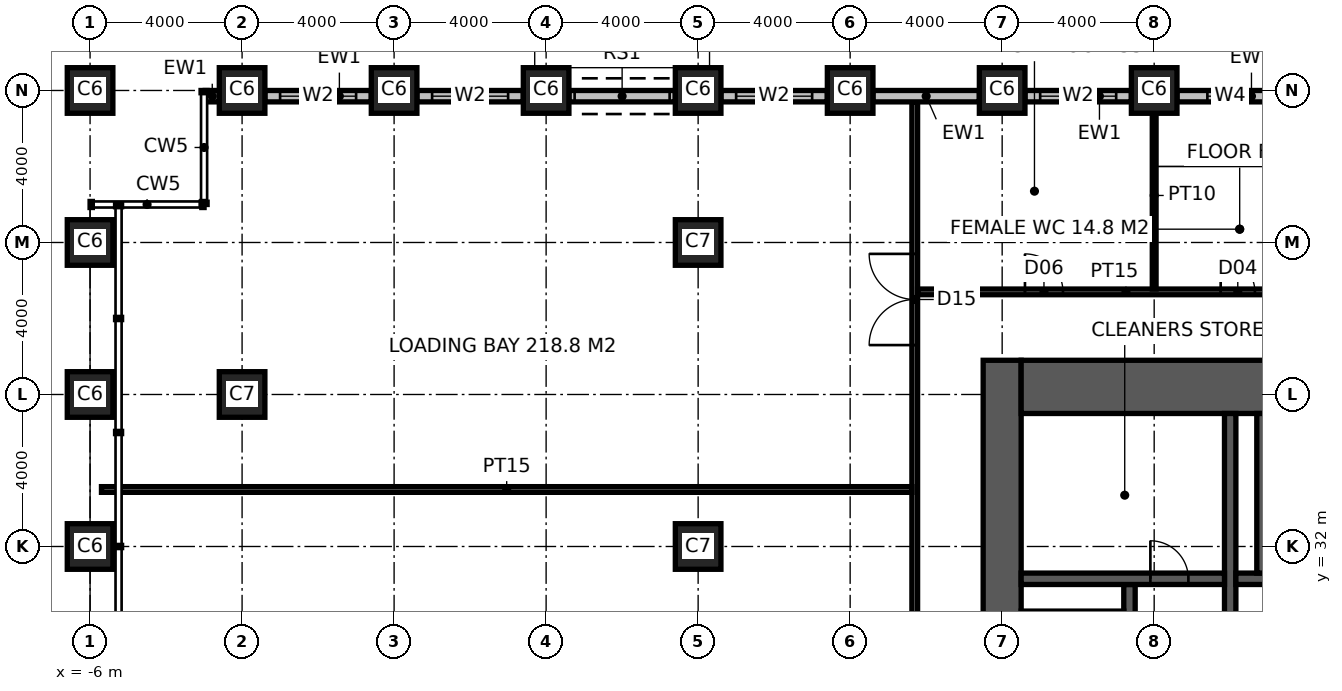
"""IFC4 building model, lengths in metres.
Left out: names, types, materials, properties, quantities, classifications, styles, units other than length and angle.
Written with IfcOpenShell. Run it as: python <this file> out.ifc"""

import sys

from ifc_helpers import new_model, si_unit, direction, frame, frame_2d, origin, origin_2d, place, context, subcontext, project, spatial, rectangle, hollow_rectangle, extrude, element, fill, save


model = new_model("IFC4")
c1 = context("Model", 3, precision=1e-05, world=origin(), true_north=direction((0.0, 1.0)))
c2 = subcontext(c1, "Body", "Model", "MODEL_VIEW")
j1 = project(units=[si_unit("LENGTHUNIT", "METRE"), si_unit("PLANEANGLEUNIT", "RADIAN")], contexts=[c1])
p1 = place(None, origin())
s1 = spatial("IfcSite", under=j1, at=p1, CompositionType="ELEMENT")
p2 = place(p1, origin())
s2 = spatial("IfcBuilding", under=s1, at=p2, CompositionType="ELEMENT")
p3 = place(p2, origin())
s3 = spatial("IfcBuildingStorey", under=s2, at=p3, CompositionType="ELEMENT", Elevation=0.0)
for number, where, z_axis, x_axis in (
    (1, (-6.0, 32.0, -0.3), (0.0, 0.0, 1.0), (1.0, 0.0, 0.0)),
    (2, (-6.0, 36.0, -0.3), (0.0, 0.0, 1.0), (1.0, 0.0, 0.0)),
    (3, (-6.0, 40.0, -0.3), (0.0, 0.0, 1.0), (1.0, 0.0, 0.0)),
    (4, (-6.0, 44.0, -0.3), (0.0, 0.0, 1.0), (1.0, 0.0, 0.0)),
    (5, (-2.0, 44.0, -0.3), (0.0, 0.0, 1.0), (1.0, 0.0, 0.0)),
    (6, (2.0, 44.0, -0.3), (0.0, 0.0, 1.0), (1.0, 0.0, 0.0)),
    (7, (6.0, 44.0, -0.3), (0.0, 0.0, 1.0), (1.0, 0.0, 0.0)),
    (8, (10.0, 44.0, -0.3), (0.0, 0.0, 1.0), (1.0, 0.0, 0.0)),
    (9, (14.0, 44.0, -0.3), (0.0, 0.0, 1.0), (1.0, 0.0, 0.0)),
    (10, (18.0, 44.0, -0.3), (0.0, 0.0, 1.0), (1.0, 0.0, 0.0)),
    (11, (22.0, 44.0, -0.3), (0.0, 0.0, 1.0), (1.0, 0.0, 0.0)),
):
    element("IfcColumn", number, at=place(p3, frame(where, z_axis=z_axis, x_axis=x_axis)), inside=s3, PredefinedType="COLUMN", context=c2, shape_type="SweptSolid", body=[
        extrude(hollow_rectangle(XDim=1.2, YDim=1.2, WallThickness=0.125, at=origin_2d()), origin(), (0.0, 0.0, 1.0), 6.3),
    ])
for number, where, z_axis, x_axis in (
    (12, (-2.0, 36.0, -0.3), (0.0, 0.0, 1.0), (1.0, 0.0, 0.0)),
    (13, (10.0, 32.0, -0.3), (0.0, 0.0, 1.0), (1.0, 0.0, 0.0)),
    (14, (10.0, 40.0, -0.3), (0.0, 0.0, 1.0), (1.0, 0.0, 0.0)),
):
    element("IfcColumn", number, at=place(p3, frame(where, z_axis=z_axis, x_axis=x_axis)), inside=s3, PredefinedType="COLUMN", context=c2, shape_type="SweptSolid", body=[
        extrude(hollow_rectangle(XDim=1.2, YDim=1.2, WallThickness=0.1, at=origin_2d()), origin(), (0.0, 0.0, 1.0), 6.3),
    ])
p4 = place(p3, frame((18.0, 17.1, -0.3), z_axis=(0.0, 0.0, 1.0), x_axis=(0.0, 1.0, 0.0)))
e15 = element("IfcWall", 15, at=p4, inside=s3, PredefinedType="SHEAR", context=c2, shape_type="SweptSolid", body=[
    extrude(rectangle(XDim=19.8, YDim=1.0, at=frame_2d((9.9, 0.0))), origin(), (0.0, 0.0, 1.0), 6.15),
])
p5 = place(p3, frame((18.5, 36.2, -0.3), z_axis=(0.0, 0.0, 1.0), x_axis=(1.0, 0.0, 0.0)))
e16 = element("IfcWall", 16, at=p5, inside=s3, PredefinedType="SHEAR", context=c2, shape_type="SweptSolid", body=[
    extrude(rectangle(XDim=23.0, YDim=1.4, at=frame_2d((11.5, 0.0))), origin(), (0.0, 0.0, 1.0), 6.15),
])
p6 = place(p5, frame((15.8, 0.0, 0.3)))
e17 = element("IfcOpeningElement", 17, at=p6, cuts=e16, PredefinedType="OPENING", context=c2, shape_type="SweptSolid", body=[
    extrude(rectangle(XDim=1.0, YDim=2.2, at=frame_2d((0.5, 1.1))), frame((0.0, 0.71, 0.0), z_axis=(0.0, -1.0, 0.0), x_axis=(1.0, 0.0, 0.0)), (0.0, 0.0, 1.0), 1.42),
])
p7 = place(p3, frame((24.0, 18.5, -0.3), z_axis=(0.0, 0.0, 1.0), x_axis=(0.0, 1.0, 0.0)))
e18 = element("IfcWall", 18, at=p7, inside=s3, PredefinedType="SHEAR", context=c2, shape_type="SweptSolid", body=[
    extrude(rectangle(XDim=17.0, YDim=0.3, at=frame_2d((8.5, 0.0))), origin(), (0.0, 0.0, 1.0), 6.15),
])
p8 = place(p7, frame((9.6, 0.0, 0.3)))
e19 = element("IfcOpeningElement", 19, at=p8, cuts=e18, PredefinedType="OPENING", context=c2, shape_type="SweptSolid", body=[
    extrude(rectangle(XDim=1.5, YDim=2.4, at=frame_2d((0.75, 1.2))), frame((0.0, 0.16, 0.0), z_axis=(0.0, -1.0, 0.0), x_axis=(1.0, 0.0, 0.0)), (0.0, 0.0, 1.0), 0.32),
])
p9 = place(p3, frame((24.15, 31.15, -0.3), z_axis=(0.0, 0.0, 1.0), x_axis=(1.0, 0.0, 0.0)))
e20 = element("IfcWall", 20, at=p9, inside=s3, PredefinedType="SHEAR", context=c2, shape_type="SweptSolid", body=[
    extrude(rectangle(XDim=11.25, YDim=0.3, at=frame_2d((5.625, 0.0))), origin(), (0.0, 0.0, 1.0), 6.15),
])
p10 = place(p9, frame((10.15, 0.0, 0.3)))
e21 = element("IfcOpeningElement", 21, at=p10, cuts=e20, PredefinedType="OPENING", context=c2, shape_type="SweptSolid", body=[
    extrude(rectangle(XDim=1.0, YDim=2.2, at=frame_2d((0.5, 1.1))), frame((0.0, 0.16, 0.0), z_axis=(0.0, -1.0, 0.0), x_axis=(1.0, 0.0, 0.0)), (0.0, 0.0, 1.0), 0.32),
])
p11 = place(p9, frame((1.6, 0.0, 0.3)))
e22 = element("IfcOpeningElement", 22, at=p11, cuts=e20, PredefinedType="OPENING", context=c2, shape_type="SweptSolid", body=[
    extrude(rectangle(XDim=1.3, YDim=2.4, at=frame_2d((0.65, 1.2))), frame((0.0, 0.16, 0.0), z_axis=(0.0, -1.0, 0.0), x_axis=(1.0, 0.0, 0.0)), (0.0, 0.0, 1.0), 0.32),
])
p12 = place(p9, frame((4.4, 0.0, 0.3)))
e23 = element("IfcOpeningElement", 23, at=p12, cuts=e20, PredefinedType="OPENING", context=c2, shape_type="SweptSolid", body=[
    extrude(rectangle(XDim=1.3, YDim=2.4, at=frame_2d((0.65, 1.2))), frame((0.0, 0.16, 0.0), z_axis=(0.0, -1.0, 0.0), x_axis=(1.0, 0.0, 0.0)), (0.0, 0.0, 1.0), 0.32),
])
p13 = place(p9, frame((7.25, 0.0, 0.3)))
e24 = element("IfcOpeningElement", 24, at=p13, cuts=e20, PredefinedType="OPENING", context=c2, shape_type="SweptSolid", body=[
    extrude(rectangle(XDim=1.4, YDim=2.4, at=frame_2d((0.7, 1.2))), frame((0.0, 0.16, 0.0), z_axis=(0.0, -1.0, 0.0), x_axis=(1.0, 0.0, 0.0)), (0.0, 0.0, 1.0), 0.32),
])
p14 = place(p3, frame((21.35, 18.5, -0.3), z_axis=(0.0, 0.0, 1.0), x_axis=(0.0, 1.0, 0.0)))
e25 = element("IfcWall", 25, at=p14, inside=s3, PredefinedType="SHEAR", context=c2, shape_type="SweptSolid", body=[
    extrude(rectangle(XDim=12.5, YDim=0.3, at=frame_2d((6.25, 0.0))), origin(), (0.0, 0.0, 1.0), 6.15),
])
p15 = place(p14, frame((8.15, 0.0, 0.3)))
e26 = element("IfcOpeningElement", 26, at=p15, cuts=e25, PredefinedType="OPENING", context=c2, shape_type="SweptSolid", body=[
    extrude(rectangle(XDim=1.0, YDim=2.2, at=frame_2d((0.5, 1.1))), frame((0.0, 0.16, 0.0), z_axis=(0.0, -1.0, 0.0), x_axis=(1.0, 0.0, 0.0)), (0.0, 0.0, 1.0), 0.32),
])
p16 = place(p3, frame((18.5, 31.15, -0.3), z_axis=(0.0, 0.0, 1.0), x_axis=(1.0, 0.0, 0.0)))
e27 = element("IfcWall", 27, at=p16, inside=s3, PredefinedType="SHEAR", context=c2, shape_type="SweptSolid", body=[
    extrude(rectangle(XDim=5.35, YDim=0.3, at=frame_2d((2.675, 0.0))), origin(), (0.0, 0.0, 1.0), 6.15),
])
p17 = place(p16, frame((3.4, 0.0, 0.3)))
e28 = element("IfcOpeningElement", 28, at=p17, cuts=e27, PredefinedType="OPENING", context=c2, shape_type="SweptSolid", body=[
    extrude(rectangle(XDim=1.0, YDim=2.2, at=frame_2d((0.5, 1.1))), frame((0.0, 0.16, 0.0), z_axis=(0.0, -1.0, 0.0), x_axis=(1.0, 0.0, 0.0)), (0.0, 0.0, 1.0), 0.32),
])
p18 = place(p3, frame((24.85, 31.3, -0.3), z_axis=(0.0, 0.0, 1.0), x_axis=(0.0, 1.0, 0.0)))
e29 = element("IfcWall", 29, at=p18, inside=s3, PredefinedType="SHEAR", context=c2, shape_type="SweptSolid", body=[
    extrude(rectangle(XDim=4.2, YDim=0.3, at=frame_2d((2.1, 0.0))), origin(), (0.0, 0.0, 1.0), 6.15),
])
p19 = place(p3, frame((15.7, 15.225, 0.0), z_axis=(0.0, 0.0, 1.0), x_axis=(0.0, 1.0, 0.0)))
e30 = element("IfcWall", 30, at=p19, inside=s3, PredefinedType="PARTITIONING", context=c2, shape_type="SweptSolid", body=[
    extrude(rectangle(XDim=28.475, YDim=0.15, at=frame_2d((14.237, 0.0))), origin(), (0.0, 0.0, 1.0), 5.85),
])
p20 = place(p19, frame((3.875, 0.0, 0.0)))
e31 = element("IfcOpeningElement", 31, at=p20, cuts=e30, PredefinedType="OPENING", context=c2, shape_type="SweptSolid", body=[
    extrude(rectangle(XDim=1.8, YDim=2.7, at=frame_2d((0.9, 1.35))), frame((0.0, 0.085, 0.0), z_axis=(0.0, -1.0, 0.0), x_axis=(1.0, 0.0, 0.0)), (0.0, 0.0, 1.0), 0.17),
])
p21 = place(p19, frame((22.075, 0.0, 0.0)))
e32 = element("IfcOpeningElement", 32, at=p21, cuts=e30, PredefinedType="OPENING", context=c2, shape_type="SweptSolid", body=[
    extrude(rectangle(XDim=2.4, YDim=2.7, at=frame_2d((1.2, 1.35))), frame((0.0, 0.085, 0.0), z_axis=(0.0, -1.0, 0.0), x_axis=(1.0, 0.0, 0.0)), (0.0, 0.0, 1.0), 0.17),
])
p22 = place(p3, frame((-5.7, 33.5, 0.0), z_axis=(0.0, 0.0, 1.0), x_axis=(1.0, 0.0, 0.0)))
e33 = element("IfcWall", 33, at=p22, inside=s3, PredefinedType="PARTITIONING", context=c2, shape_type="SweptSolid", body=[
    extrude(rectangle(XDim=21.325, YDim=0.15, at=frame_2d((10.663, 0.0))), origin(), (0.0, 0.0, 1.0), 5.85),
])
p23 = place(p3, frame((15.775, 38.7, 0.0), z_axis=(0.0, 0.0, 1.0), x_axis=(1.0, 0.0, 0.0)))
e34 = element("IfcWall", 34, at=p23, inside=s3, PredefinedType="PARTITIONING", context=c2, shape_type="SweptSolid", body=[
    extrude(rectangle(XDim=18.275, YDim=0.15, at=frame_2d((9.138, 0.0))), origin(), (0.0, 0.0, 1.0), 5.85),
])
p24 = place(p23, frame((2.825, 0.0, 0.0)))
e35 = element("IfcOpeningElement", 35, at=p24, cuts=e34, PredefinedType="OPENING", context=c2, shape_type="SweptSolid", body=[
    extrude(rectangle(XDim=1.0, YDim=2.2, at=frame_2d((0.5, 1.1))), frame((0.0, 0.085, 0.0), z_axis=(0.0, -1.0, 0.0), x_axis=(1.0, 0.0, 0.0)), (0.0, 0.0, 1.0), 0.17),
])
p25 = place(p23, frame((7.975, 0.0, 0.0)))
e36 = element("IfcOpeningElement", 36, at=p25, cuts=e34, PredefinedType="OPENING", context=c2, shape_type="SweptSolid", body=[
    extrude(rectangle(XDim=0.9, YDim=2.1, at=frame_2d((0.45, 1.05))), frame((0.0, 0.085, 0.0), z_axis=(0.0, -1.0, 0.0), x_axis=(1.0, 0.0, 0.0)), (0.0, 0.0, 1.0), 0.17),
])
p26 = place(p23, frame((11.725, 0.0, 0.0)))
e37 = element("IfcOpeningElement", 37, at=p26, cuts=e34, PredefinedType="OPENING", context=c2, shape_type="SweptSolid", body=[
    extrude(rectangle(XDim=1.0, YDim=2.1, at=frame_2d((0.5, 1.05))), frame((0.0, 0.085, 0.0), z_axis=(0.0, -1.0, 0.0), x_axis=(1.0, 0.0, 0.0)), (0.0, 0.0, 1.0), 0.17),
])
p27 = place(p23, frame((15.575, 0.0, 0.0)))
e38 = element("IfcOpeningElement", 38, at=p27, cuts=e34, PredefinedType="OPENING", context=c2, shape_type="SweptSolid", body=[
    extrude(rectangle(XDim=0.9, YDim=2.1, at=frame_2d((0.45, 1.05))), frame((0.0, 0.085, 0.0), z_axis=(0.0, -1.0, 0.0), x_axis=(1.0, 0.0, 0.0)), (0.0, 0.0, 1.0), 0.17),
])
p28 = place(p3, frame((22.0, 38.775, 0.0), z_axis=(0.0, 0.0, 1.0), x_axis=(0.0, 1.0, 0.0)))
e39 = element("IfcWall", 39, at=p28, inside=s3, PredefinedType="PARTITIONING", context=c2, shape_type="SweptSolid", body=[
    extrude(rectangle(XDim=4.925, YDim=0.1, at=frame_2d((2.462, 0.0))), origin(), (0.0, 0.0, 1.0), 4.95),
])
p29 = place(p3, frame((-2.6, 43.85, 0.0), z_axis=(0.0, 0.0, 1.0), x_axis=(-1.0, 0.0, 0.0)))
e40 = element("IfcWall", 40, at=p29, inside=s3, PredefinedType="ELEMENTEDWALL", context=c2, shape_type="SweptSolid", body=[
    extrude(rectangle(XDim=0.37, YDim=0.3, at=frame_2d((0.185, 0.0))), origin(), (0.0, 0.0, 1.0), 4.95),
])
p30 = place(p3, frame((1.4, 43.85, 0.0), z_axis=(0.0, 0.0, 1.0), x_axis=(-1.0, 0.0, 0.0)))
e41 = element("IfcWall", 41, at=p30, inside=s3, PredefinedType="ELEMENTEDWALL", context=c2, shape_type="SweptSolid", body=[
    extrude(rectangle(XDim=2.8, YDim=0.3, at=frame_2d((1.4, 0.0))), origin(), (0.0, 0.0, 1.0), 4.95),
])
p31 = place(p30, frame((0.4, 0.0, 1.2)))
e42 = element("IfcOpeningElement", 42, at=p31, cuts=e41, PredefinedType="OPENING", context=c2, shape_type="SweptSolid", body=[
    extrude(rectangle(XDim=2.0, YDim=3.6, at=frame_2d((1.0, 1.8))), frame((0.0, 0.16, 0.0), z_axis=(0.0, -1.0, 0.0), x_axis=(1.0, 0.0, 0.0)), (0.0, 0.0, 1.0), 0.32),
])
p32 = place(p3, frame((5.4, 43.85, 0.0), z_axis=(0.0, 0.0, 1.0), x_axis=(-1.0, 0.0, 0.0)))
e43 = element("IfcWall", 43, at=p32, inside=s3, PredefinedType="ELEMENTEDWALL", context=c2, shape_type="SweptSolid", body=[
    extrude(rectangle(XDim=2.8, YDim=0.3, at=frame_2d((1.4, 0.0))), origin(), (0.0, 0.0, 1.0), 4.95),
])
p33 = place(p32, frame((0.4, 0.0, 1.2)))
e44 = element("IfcOpeningElement", 44, at=p33, cuts=e43, PredefinedType="OPENING", context=c2, shape_type="SweptSolid", body=[
    extrude(rectangle(XDim=2.0, YDim=3.6, at=frame_2d((1.0, 1.8))), frame((0.0, 0.16, 0.0), z_axis=(0.0, -1.0, 0.0), x_axis=(1.0, 0.0, 0.0)), (0.0, 0.0, 1.0), 0.32),
])
p34 = place(p3, frame((9.4, 43.85, 0.0), z_axis=(0.0, 0.0, 1.0), x_axis=(-1.0, 0.0, 0.0)))
e45 = element("IfcWall", 45, at=p34, inside=s3, PredefinedType="ELEMENTEDWALL", context=c2, shape_type="SweptSolid", body=[
    extrude(rectangle(XDim=2.8, YDim=0.3, at=frame_2d((1.4, 0.0))), origin(), (0.0, 0.0, 1.0), 4.95),
])
p35 = place(p34, frame((0.15, 0.0, 0.0)))
e46 = element("IfcOpeningElement", 46, at=p35, cuts=e45, PredefinedType="OPENING", context=c2, shape_type="SweptSolid", body=[
    extrude(rectangle(XDim=2.5, YDim=4.5, at=frame_2d((1.25, 2.25))), frame((0.0, 0.16, 0.0), z_axis=(0.0, -1.0, 0.0), x_axis=(1.0, 0.0, 0.0)), (0.0, 0.0, 1.0), 0.32),
])
p36 = place(p3, frame((13.4, 43.85, 0.0), z_axis=(0.0, 0.0, 1.0), x_axis=(-1.0, 0.0, 0.0)))
e47 = element("IfcWall", 47, at=p36, inside=s3, PredefinedType="ELEMENTEDWALL", context=c2, shape_type="SweptSolid", body=[
    extrude(rectangle(XDim=2.8, YDim=0.3, at=frame_2d((1.4, 0.0))), origin(), (0.0, 0.0, 1.0), 4.95),
])
p37 = place(p36, frame((0.4, 0.0, 1.2)))
e48 = element("IfcOpeningElement", 48, at=p37, cuts=e47, PredefinedType="OPENING", context=c2, shape_type="SweptSolid", body=[
    extrude(rectangle(XDim=2.0, YDim=3.6, at=frame_2d((1.0, 1.8))), frame((0.0, 0.16, 0.0), z_axis=(0.0, -1.0, 0.0), x_axis=(1.0, 0.0, 0.0)), (0.0, 0.0, 1.0), 0.32),
])
p38 = place(p3, frame((17.4, 43.85, 0.0), z_axis=(0.0, 0.0, 1.0), x_axis=(-1.0, 0.0, 0.0)))
e49 = element("IfcWall", 49, at=p38, inside=s3, PredefinedType="ELEMENTEDWALL", context=c2, shape_type="SweptSolid", body=[
    extrude(rectangle(XDim=2.8, YDim=0.3, at=frame_2d((1.4, 0.0))), origin(), (0.0, 0.0, 1.0), 4.95),
])
p39 = place(p3, frame((21.4, 43.85, 0.0), z_axis=(0.0, 0.0, 1.0), x_axis=(-1.0, 0.0, 0.0)))
e50 = element("IfcWall", 50, at=p39, inside=s3, PredefinedType="ELEMENTEDWALL", context=c2, shape_type="SweptSolid", body=[
    extrude(rectangle(XDim=2.8, YDim=0.3, at=frame_2d((1.4, 0.0))), origin(), (0.0, 0.0, 1.0), 4.95),
])
p40 = place(p39, frame((0.4, 0.0, 1.2)))
e51 = element("IfcOpeningElement", 51, at=p40, cuts=e50, PredefinedType="OPENING", context=c2, shape_type="SweptSolid", body=[
    extrude(rectangle(XDim=2.0, YDim=3.6, at=frame_2d((1.0, 1.8))), frame((0.0, 0.16, 0.0), z_axis=(0.0, -1.0, 0.0), x_axis=(1.0, 0.0, 0.0)), (0.0, 0.0, 1.0), 0.32),
])
p41 = place(p3, frame((25.4, 43.85, 0.0), z_axis=(0.0, 0.0, 1.0), x_axis=(-1.0, 0.0, 0.0)))
e52 = element("IfcWall", 52, at=p41, inside=s3, PredefinedType="ELEMENTEDWALL", context=c2, shape_type="SweptSolid", body=[
    extrude(rectangle(XDim=2.8, YDim=0.3, at=frame_2d((1.4, 0.0))), origin(), (0.0, 0.0, 1.0), 4.95),
])
p42 = place(p41, frame((0.8, 0.0, 1.8)))
e53 = element("IfcOpeningElement", 53, at=p42, cuts=e52, PredefinedType="OPENING", context=c2, shape_type="SweptSolid", body=[
    extrude(rectangle(XDim=1.2, YDim=1.2, at=frame_2d((0.6, 0.6))), frame((0.0, 0.16, 0.0), z_axis=(0.0, -1.0, 0.0), x_axis=(1.0, 0.0, 0.0)), (0.0, 0.0, 1.0), 0.32),
])
p43 = place(p17, origin())
e54 = element("IfcDoor", 54, at=p43, inside=s3, OperationType="SINGLE_SWING_LEFT", PredefinedType="DOOR", context=c2, shape_type="SweptSolid", body=[
    extrude(rectangle(XDim=1.0, YDim=2.2, at=frame_2d((0.5, 1.1))), frame((0.0, 0.025, 0.0), z_axis=(0.0, -1.0, 0.0), x_axis=(1.0, 0.0, 0.0)), (0.0, 0.0, 1.0), 0.05),
])
fill(e28, e54)
p44 = place(p21, origin())
e55 = element("IfcDoor", 55, at=p44, inside=s3, OperationType="DOUBLE_DOOR_DOUBLE_SWING", PredefinedType="DOOR", context=c2, shape_type="SweptSolid", body=[
    extrude(rectangle(XDim=2.4, YDim=2.7, at=frame_2d((1.2, 1.35))), frame((0.0, 0.025, 0.0), z_axis=(0.0, -1.0, 0.0), x_axis=(1.0, 0.0, 0.0)), (0.0, 0.0, 1.0), 0.05),
])
fill(e32, e55)
p45 = place(p24, origin())
e56 = element("IfcDoor", 56, at=p45, inside=s3, OperationType="SINGLE_SWING_LEFT", PredefinedType="DOOR", context=c2, shape_type="SweptSolid", body=[
    extrude(rectangle(XDim=1.0, YDim=2.2, at=frame_2d((0.5, 1.1))), frame((0.0, 0.025, 0.0), z_axis=(0.0, -1.0, 0.0), x_axis=(1.0, 0.0, 0.0)), (0.0, 0.0, 1.0), 0.05),
])
fill(e35, e56)
p46 = place(p25, origin())
e57 = element("IfcDoor", 57, at=p46, inside=s3, OperationType="SINGLE_SWING_LEFT", PredefinedType="DOOR", context=c2, shape_type="SweptSolid", body=[
    extrude(rectangle(XDim=0.9, YDim=2.1, at=frame_2d((0.45, 1.05))), frame((0.0, 0.025, 0.0), z_axis=(0.0, -1.0, 0.0), x_axis=(1.0, 0.0, 0.0)), (0.0, 0.0, 1.0), 0.05),
])
fill(e36, e57)
p47 = place(p31, origin())
e58 = element("IfcWindow", 58, at=p47, inside=s3, PartitioningType="SINGLE_PANEL", PredefinedType="WINDOW", context=c2, shape_type="SweptSolid", body=[
    extrude(rectangle(XDim=2.0, YDim=3.6, at=frame_2d((1.0, 1.8))), frame((0.0, 0.03, 0.0), z_axis=(0.0, -1.0, 0.0), x_axis=(1.0, 0.0, 0.0)), (0.0, 0.0, 1.0), 0.06),
])
fill(e42, e58)
p48 = place(p33, origin())
e59 = element("IfcWindow", 59, at=p48, inside=s3, PartitioningType="SINGLE_PANEL", PredefinedType="WINDOW", context=c2, shape_type="SweptSolid", body=[
    extrude(rectangle(XDim=2.0, YDim=3.6, at=frame_2d((1.0, 1.8))), frame((0.0, 0.03, 0.0), z_axis=(0.0, -1.0, 0.0), x_axis=(1.0, 0.0, 0.0)), (0.0, 0.0, 1.0), 0.06),
])
fill(e44, e59)
p49 = place(p35, origin())
e60 = element("IfcDoor", 60, at=p49, inside=s3, OperationType="USERDEFINED", PredefinedType="DOOR", context=c2, shape_type="SweptSolid", body=[
    extrude(rectangle(XDim=2.5, YDim=4.5, at=frame_2d((1.25, 2.25))), frame((0.0, 0.025, 0.0), z_axis=(0.0, -1.0, 0.0), x_axis=(1.0, 0.0, 0.0)), (0.0, 0.0, 1.0), 0.05),
])
fill(e46, e60)
p50 = place(p37, origin())
e61 = element("IfcWindow", 61, at=p50, inside=s3, PartitioningType="SINGLE_PANEL", PredefinedType="WINDOW", context=c2, shape_type="SweptSolid", body=[
    extrude(rectangle(XDim=2.0, YDim=3.6, at=frame_2d((1.0, 1.8))), frame((0.0, 0.03, 0.0), z_axis=(0.0, -1.0, 0.0), x_axis=(1.0, 0.0, 0.0)), (0.0, 0.0, 1.0), 0.06),
])
fill(e48, e61)
p51 = place(p40, origin())
e62 = element("IfcWindow", 62, at=p51, inside=s3, PartitioningType="SINGLE_PANEL", PredefinedType="WINDOW", context=c2, shape_type="SweptSolid", body=[
    extrude(rectangle(XDim=2.0, YDim=3.6, at=frame_2d((1.0, 1.8))), frame((0.0, 0.03, 0.0), z_axis=(0.0, -1.0, 0.0), x_axis=(1.0, 0.0, 0.0)), (0.0, 0.0, 1.0), 0.06),
])
fill(e51, e62)
p52 = place(p42, origin())
e63 = element("IfcWindow", 63, at=p52, inside=s3, PartitioningType="SINGLE_PANEL", PredefinedType="WINDOW", context=c2, shape_type="SweptSolid", body=[
    extrude(rectangle(XDim=1.2, YDim=1.2, at=frame_2d((0.6, 0.6))), frame((0.0, 0.03, 0.0), z_axis=(0.0, -1.0, 0.0), x_axis=(1.0, 0.0, 0.0)), (0.0, 0.0, 1.0), 0.06),
])
fill(e53, e63)
save(model, sys.argv[1])
